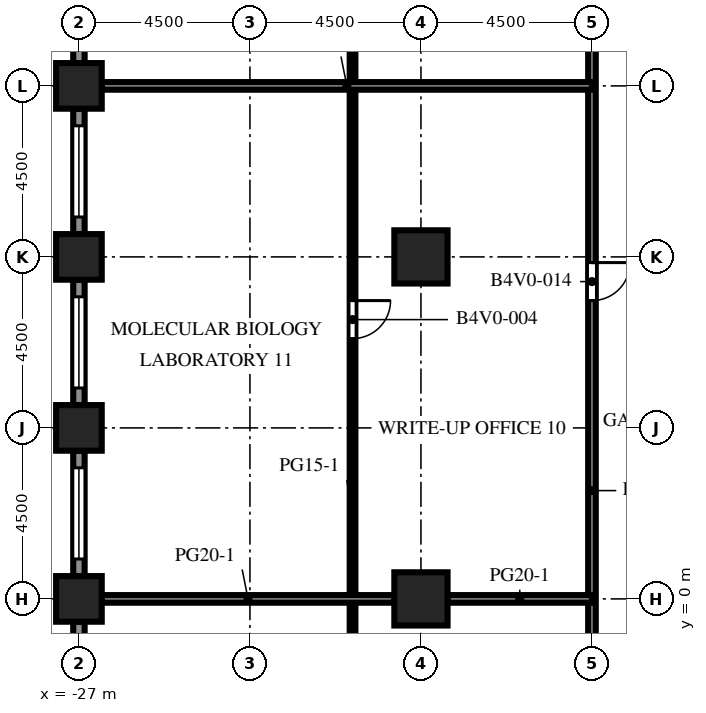
"""IFC4 building model, lengths in metres.
Left out: names, types, materials, properties, quantities, classifications, styles, units other than length and angle.
Written with IfcOpenShell. Run it as: python <this file> out.ifc"""

import sys

from ifc_helpers import new_model, si_unit, direction, frame, frame_2d, origin, origin_2d, place, context, subcontext, project, spatial, rectangle, extrude, element, fill, save


model = new_model("IFC4")
c1 = context("Model", 3, precision=1e-05, world=origin(), true_north=direction((0.0, 1.0)))
c2 = subcontext(c1, "Body", "Model", "MODEL_VIEW")
j1 = project(units=[si_unit("LENGTHUNIT", "METRE"), si_unit("PLANEANGLEUNIT", "RADIAN")], contexts=[c1])
p1 = place(None, origin())
s1 = spatial("IfcSite", under=j1, at=p1, CompositionType="ELEMENT")
p2 = place(p1, origin())
s2 = spatial("IfcBuilding", under=s1, at=p2, CompositionType="ELEMENT")
p3 = place(p2, frame((0.0, 0.0, 120.8)))
s3 = spatial("IfcBuildingStorey", under=s2, at=p3, CompositionType="ELEMENT", Elevation=120.8)
for number, where, z_axis, x_axis in (
    (1, (-27.0, 0.0, 0.0), (0.0, 0.0, 1.0), (1.0, 0.0, 0.0)),
    (2, (-27.0, 4.5, 0.0), (0.0, 0.0, 1.0), (1.0, 0.0, 0.0)),
    (3, (-27.0, 9.0, 0.0), (0.0, 0.0, 1.0), (1.0, 0.0, 0.0)),
    (4, (-27.0, 13.5, 0.0), (0.0, 0.0, 1.0), (1.0, 0.0, 0.0)),
):
    element("IfcColumn", number, at=place(p3, frame(where, z_axis=z_axis, x_axis=x_axis)), inside=s3, PredefinedType="COLUMN", context=c2, shape_type="SweptSolid", body=[
        extrude(rectangle(XDim=1.2, YDim=1.2, at=origin_2d()), origin(), (0.0, 0.0, 1.0), 4.1),
    ])
for number, where, z_axis, x_axis in (
    (5, (-18.0, 0.0, 0.0), (0.0, 0.0, 1.0), (1.0, 0.0, 0.0)),
    (6, (-18.0, 9.0, 0.0), (0.0, 0.0, 1.0), (1.0, 0.0, 0.0)),
):
    element("IfcColumn", number, at=place(p3, frame(where, z_axis=z_axis, x_axis=x_axis)), inside=s3, PredefinedType="COLUMN", context=c2, shape_type="SweptSolid", body=[
        extrude(rectangle(XDim=1.4, YDim=1.4, at=origin_2d()), origin(), (0.0, 0.0, 1.0), 4.1),
    ])
p4 = place(p3, frame((-27.0, 14.1, 0.0), z_axis=(0.0, 0.0, 1.0), x_axis=(0.0, 1.0, 0.0)))
e7 = element("IfcWall", 7, at=p4, inside=s3, PredefinedType="SOLIDWALL", context=c2, shape_type="SweptSolid", body=[
    extrude(rectangle(XDim=3.3, YDim=0.3, at=frame_2d((1.65, 0.0))), origin(), (0.0, 0.0, 1.0), 2.75),
])
p5 = place(p4, frame((0.45, 0.0, 0.8)))
e8 = element("IfcOpeningElement", 8, at=p5, cuts=e7, PredefinedType="OPENING", context=c2, shape_type="SweptSolid", body=[
    extrude(rectangle(XDim=2.4, YDim=1.7, at=frame_2d((1.2, 0.85))), frame((0.0, 0.16, 0.0), z_axis=(0.0, -1.0, 0.0), x_axis=(1.0, 0.0, 0.0)), (0.0, 0.0, 1.0), 0.32),
])
p6 = place(p3, frame((-27.0, 9.6, 0.0), z_axis=(0.0, 0.0, 1.0), x_axis=(0.0, 1.0, 0.0)))
e9 = element("IfcWall", 9, at=p6, inside=s3, PredefinedType="SOLIDWALL", context=c2, shape_type="SweptSolid", body=[
    extrude(rectangle(XDim=3.3, YDim=0.3, at=frame_2d((1.65, 0.0))), origin(), (0.0, 0.0, 1.0), 2.75),
])
p7 = place(p6, frame((0.45, 0.0, 0.8)))
e10 = element("IfcOpeningElement", 10, at=p7, cuts=e9, PredefinedType="OPENING", context=c2, shape_type="SweptSolid", body=[
    extrude(rectangle(XDim=2.4, YDim=1.7, at=frame_2d((1.2, 0.85))), frame((0.0, 0.16, 0.0), z_axis=(0.0, -1.0, 0.0), x_axis=(1.0, 0.0, 0.0)), (0.0, 0.0, 1.0), 0.32),
])
p8 = place(p3, frame((-27.0, 5.1, 0.0), z_axis=(0.0, 0.0, 1.0), x_axis=(0.0, 1.0, 0.0)))
e11 = element("IfcWall", 11, at=p8, inside=s3, PredefinedType="SOLIDWALL", context=c2, shape_type="SweptSolid", body=[
    extrude(rectangle(XDim=3.3, YDim=0.3, at=frame_2d((1.65, 0.0))), origin(), (0.0, 0.0, 1.0), 2.75),
])
p9 = place(p8, frame((0.45, 0.0, 0.8)))
e12 = element("IfcOpeningElement", 12, at=p9, cuts=e11, PredefinedType="OPENING", context=c2, shape_type="SweptSolid", body=[
    extrude(rectangle(XDim=2.4, YDim=1.7, at=frame_2d((1.2, 0.85))), frame((0.0, 0.16, 0.0), z_axis=(0.0, -1.0, 0.0), x_axis=(1.0, 0.0, 0.0)), (0.0, 0.0, 1.0), 0.32),
])
p10 = place(p3, frame((-27.0, 0.6, 0.0), z_axis=(0.0, 0.0, 1.0), x_axis=(0.0, 1.0, 0.0)))
e13 = element("IfcWall", 13, at=p10, inside=s3, PredefinedType="SOLIDWALL", context=c2, shape_type="SweptSolid", body=[
    extrude(rectangle(XDim=3.3, YDim=0.3, at=frame_2d((1.65, 0.0))), origin(), (0.0, 0.0, 1.0), 2.75),
])
p11 = place(p10, frame((0.45, 0.0, 0.8)))
e14 = element("IfcOpeningElement", 14, at=p11, cuts=e13, PredefinedType="OPENING", context=c2, shape_type="SweptSolid", body=[
    extrude(rectangle(XDim=2.4, YDim=1.7, at=frame_2d((1.2, 0.85))), frame((0.0, 0.16, 0.0), z_axis=(0.0, -1.0, 0.0), x_axis=(1.0, 0.0, 0.0)), (0.0, 0.0, 1.0), 0.32),
])
p12 = place(p3, frame((-27.0, -3.9, 0.0), z_axis=(0.0, 0.0, 1.0), x_axis=(0.0, 1.0, 0.0)))
e15 = element("IfcWall", 15, at=p12, inside=s3, PredefinedType="SOLIDWALL", context=c2, shape_type="SweptSolid", body=[
    extrude(rectangle(XDim=3.3, YDim=0.3, at=frame_2d((1.65, 0.0))), origin(), (0.0, 0.0, 1.0), 2.75),
])
p13 = place(p12, frame((0.45, 0.0, 0.8)))
e16 = element("IfcOpeningElement", 16, at=p13, cuts=e15, PredefinedType="OPENING", context=c2, shape_type="SweptSolid", body=[
    extrude(rectangle(XDim=2.4, YDim=1.7, at=frame_2d((1.2, 0.85))), frame((0.0, 0.16, 0.0), z_axis=(0.0, -1.0, 0.0), x_axis=(1.0, 0.0, 0.0)), (0.0, 0.0, 1.0), 0.32),
])
p14 = place(p3, frame((-19.8, -22.35, 0.0), z_axis=(0.0, 0.0, 1.0), x_axis=(0.0, 1.0, 0.0)))
e17 = element("IfcWall", 17, at=p14, inside=s3, PredefinedType="PARTITIONING", context=c2, shape_type="SweptSolid", body=[
    extrude(rectangle(XDim=53.7, YDim=0.15, at=frame_2d((26.85, 0.0))), origin(), (0.0, 0.0, 1.0), 3.65),
])
p15 = place(p14, frame((5.2, 0.0, 0.0)))
e18 = element("IfcOpeningElement", 18, at=p15, cuts=e17, PredefinedType="OPENING", context=c2, shape_type="SweptSolid", body=[
    extrude(rectangle(XDim=1.0, YDim=2.1, at=frame_2d((0.5, 1.05))), frame((0.0, 0.085, 0.0), z_axis=(0.0, -1.0, 0.0), x_axis=(1.0, 0.0, 0.0)), (0.0, 0.0, 1.0), 0.17),
])
p16 = place(p14, frame((14.2, 0.0, 0.0)))
e19 = element("IfcOpeningElement", 19, at=p16, cuts=e17, PredefinedType="OPENING", context=c2, shape_type="SweptSolid", body=[
    extrude(rectangle(XDim=1.0, YDim=2.1, at=frame_2d((0.5, 1.05))), frame((0.0, 0.085, 0.0), z_axis=(0.0, -1.0, 0.0), x_axis=(1.0, 0.0, 0.0)), (0.0, 0.0, 1.0), 0.17),
])
p17 = place(p14, frame((19.2, 0.0, 0.0)))
e20 = element("IfcOpeningElement", 20, at=p17, cuts=e17, PredefinedType="OPENING", context=c2, shape_type="SweptSolid", body=[
    extrude(rectangle(XDim=1.0, YDim=2.1, at=frame_2d((0.5, 1.05))), frame((0.0, 0.085, 0.0), z_axis=(0.0, -1.0, 0.0), x_axis=(1.0, 0.0, 0.0)), (0.0, 0.0, 1.0), 0.17),
])
p18 = place(p14, frame((29.2, 0.0, 0.0)))
e21 = element("IfcOpeningElement", 21, at=p18, cuts=e17, PredefinedType="OPENING", context=c2, shape_type="SweptSolid", body=[
    extrude(rectangle(XDim=1.0, YDim=2.1, at=frame_2d((0.5, 1.05))), frame((0.0, 0.085, 0.0), z_axis=(0.0, -1.0, 0.0), x_axis=(1.0, 0.0, 0.0)), (0.0, 0.0, 1.0), 0.17),
])
p19 = place(p14, frame((38.45, 0.0, 0.0)))
e22 = element("IfcOpeningElement", 22, at=p19, cuts=e17, PredefinedType="OPENING", context=c2, shape_type="SweptSolid", body=[
    extrude(rectangle(XDim=1.0, YDim=2.1, at=frame_2d((0.5, 1.05))), frame((0.0, 0.085, 0.0), z_axis=(0.0, -1.0, 0.0), x_axis=(1.0, 0.0, 0.0)), (0.0, 0.0, 1.0), 0.17),
])
p20 = place(p14, frame((47.45, 0.0, 0.0)))
e23 = element("IfcOpeningElement", 23, at=p20, cuts=e17, PredefinedType="OPENING", context=c2, shape_type="SweptSolid", body=[
    extrude(rectangle(XDim=1.0, YDim=2.1, at=frame_2d((0.5, 1.05))), frame((0.0, 0.085, 0.0), z_axis=(0.0, -1.0, 0.0), x_axis=(1.0, 0.0, 0.0)), (0.0, 0.0, 1.0), 0.17),
])
p21 = place(p3, frame((-13.5, -21.9, 0.0), z_axis=(0.0, 0.0, 1.0), x_axis=(0.0, 1.0, 0.0)))
e24 = element("IfcWall", 24, at=p21, inside=s3, PredefinedType="PARTITIONING", context=c2, shape_type="SweptSolid", body=[
    extrude(rectangle(XDim=52.8, YDim=0.2, at=frame_2d((26.4, 0.0))), origin(), (0.0, 0.0, 1.0), 3.65),
])
p22 = place(p21, frame((4.5, 0.0, 0.0)))
e25 = element("IfcOpeningElement", 25, at=p22, cuts=e24, PredefinedType="OPENING", context=c2, shape_type="SweptSolid", body=[
    extrude(rectangle(XDim=1.0, YDim=2.1, at=frame_2d((0.5, 1.05))), frame((0.0, 0.11, 0.0), z_axis=(0.0, -1.0, 0.0), x_axis=(1.0, 0.0, 0.0)), (0.0, 0.0, 1.0), 0.22),
])
p23 = place(p21, frame((12.0, 0.0, 0.0)))
e26 = element("IfcOpeningElement", 26, at=p23, cuts=e24, PredefinedType="OPENING", context=c2, shape_type="SweptSolid", body=[
    extrude(rectangle(XDim=1.0, YDim=2.1, at=frame_2d((0.5, 1.05))), frame((0.0, 0.11, 0.0), z_axis=(0.0, -1.0, 0.0), x_axis=(1.0, 0.0, 0.0)), (0.0, 0.0, 1.0), 0.22),
])
p24 = place(p21, frame((18.75, 0.0, 0.0)))
e27 = element("IfcOpeningElement", 27, at=p24, cuts=e24, PredefinedType="OPENING", context=c2, shape_type="SweptSolid", body=[
    extrude(rectangle(XDim=1.0, YDim=2.1, at=frame_2d((0.5, 1.05))), frame((0.0, 0.11, 0.0), z_axis=(0.0, -1.0, 0.0), x_axis=(1.0, 0.0, 0.0)), (0.0, 0.0, 1.0), 0.22),
])
p25 = place(p21, frame((29.75, 0.0, 0.0)))
e28 = element("IfcOpeningElement", 28, at=p25, cuts=e24, PredefinedType="OPENING", context=c2, shape_type="SweptSolid", body=[
    extrude(rectangle(XDim=1.0, YDim=2.1, at=frame_2d((0.5, 1.05))), frame((0.0, 0.11, 0.0), z_axis=(0.0, -1.0, 0.0), x_axis=(1.0, 0.0, 0.0)), (0.0, 0.0, 1.0), 0.22),
])
p26 = place(p21, frame((38.0, 0.0, 0.0)))
e29 = element("IfcOpeningElement", 29, at=p26, cuts=e24, PredefinedType="OPENING", context=c2, shape_type="SweptSolid", body=[
    extrude(rectangle(XDim=1.0, YDim=2.1, at=frame_2d((0.5, 1.05))), frame((0.0, 0.11, 0.0), z_axis=(0.0, -1.0, 0.0), x_axis=(1.0, 0.0, 0.0)), (0.0, 0.0, 1.0), 0.22),
])
p27 = place(p21, frame((48.0, 0.0, 0.0)))
e30 = element("IfcOpeningElement", 30, at=p27, cuts=e24, PredefinedType="OPENING", context=c2, shape_type="SweptSolid", body=[
    extrude(rectangle(XDim=1.0, YDim=2.1, at=frame_2d((0.5, 1.05))), frame((0.0, 0.11, 0.0), z_axis=(0.0, -1.0, 0.0), x_axis=(1.0, 0.0, 0.0)), (0.0, 0.0, 1.0), 0.22),
])
p28 = place(p3, frame((-26.4, 0.0, 0.0), z_axis=(0.0, 0.0, 1.0), x_axis=(1.0, 0.0, 0.0)))
e31 = element("IfcWall", 31, at=p28, inside=s3, PredefinedType="PARTITIONING", context=c2, shape_type="SweptSolid", body=[
    extrude(rectangle(XDim=7.7, YDim=0.2, at=frame_2d((3.85, 0.0))), origin(), (0.0, 0.0, 1.0), 3.65),
])
p29 = place(p3, frame((-17.3, 0.0, 0.0), z_axis=(0.0, 0.0, 1.0), x_axis=(1.0, 0.0, 0.0)))
e32 = element("IfcWall", 32, at=p29, inside=s3, PredefinedType="PARTITIONING", context=c2, shape_type="SweptSolid", body=[
    extrude(rectangle(XDim=3.8, YDim=0.2, at=frame_2d((1.9, 0.0))), origin(), (0.0, 0.0, 1.0), 3.65),
])
p30 = place(p3, frame((-26.4, 13.5, 0.0), z_axis=(0.0, 0.0, 1.0), x_axis=(1.0, 0.0, 0.0)))
e33 = element("IfcWall", 33, at=p30, inside=s3, PredefinedType="PARTITIONING", context=c2, shape_type="SweptSolid", body=[
    extrude(rectangle(XDim=12.9, YDim=0.2, at=frame_2d((6.45, 0.0))), origin(), (0.0, 0.0, 1.0), 3.65),
])
p31 = place(p7, origin())
e34 = element("IfcWindow", 34, at=p31, inside=s3, PartitioningType="SINGLE_PANEL", PredefinedType="WINDOW", context=c2, shape_type="SweptSolid", body=[
    extrude(rectangle(XDim=2.4, YDim=1.7, at=frame_2d((1.2, 0.85))), frame((0.0, 0.03, 0.0), z_axis=(0.0, -1.0, 0.0), x_axis=(1.0, 0.0, 0.0)), (0.0, 0.0, 1.0), 0.06),
])
fill(e10, e34)
p32 = place(p9, origin())
e35 = element("IfcWindow", 35, at=p32, inside=s3, PartitioningType="SINGLE_PANEL", PredefinedType="WINDOW", context=c2, shape_type="SweptSolid", body=[
    extrude(rectangle(XDim=2.4, YDim=1.7, at=frame_2d((1.2, 0.85))), frame((0.0, 0.03, 0.0), z_axis=(0.0, -1.0, 0.0), x_axis=(1.0, 0.0, 0.0)), (0.0, 0.0, 1.0), 0.06),
])
fill(e12, e35)
p33 = place(p11, origin())
e36 = element("IfcWindow", 36, at=p33, inside=s3, PartitioningType="SINGLE_PANEL", PredefinedType="WINDOW", context=c2, shape_type="SweptSolid", body=[
    extrude(rectangle(XDim=2.4, YDim=1.7, at=frame_2d((1.2, 0.85))), frame((0.0, 0.03, 0.0), z_axis=(0.0, -1.0, 0.0), x_axis=(1.0, 0.0, 0.0)), (0.0, 0.0, 1.0), 0.06),
])
fill(e14, e36)
p34 = place(p18, origin())
e37 = element("IfcDoor", 37, at=p34, inside=s3, OperationType="SINGLE_SWING_RIGHT", PredefinedType="DOOR", context=c2, shape_type="SweptSolid", body=[
    extrude(rectangle(XDim=1.0, YDim=2.1, at=frame_2d((0.5, 1.05))), frame((0.0, 0.025, 0.0), z_axis=(0.0, -1.0, 0.0), x_axis=(1.0, 0.0, 0.0)), (0.0, 0.0, 1.0), 0.05),
])
fill(e21, e37)
p35 = place(p25, origin())
e38 = element("IfcDoor", 38, at=p35, inside=s3, OperationType="SINGLE_SWING_RIGHT", PredefinedType="DOOR", context=c2, shape_type="SweptSolid", body=[
    extrude(rectangle(XDim=1.0, YDim=2.1, at=frame_2d((0.5, 1.05))), frame((0.0, 0.025, 0.0), z_axis=(0.0, -1.0, 0.0), x_axis=(1.0, 0.0, 0.0)), (0.0, 0.0, 1.0), 0.05),
])
fill(e28, e38)
save(model, sys.argv[1])
